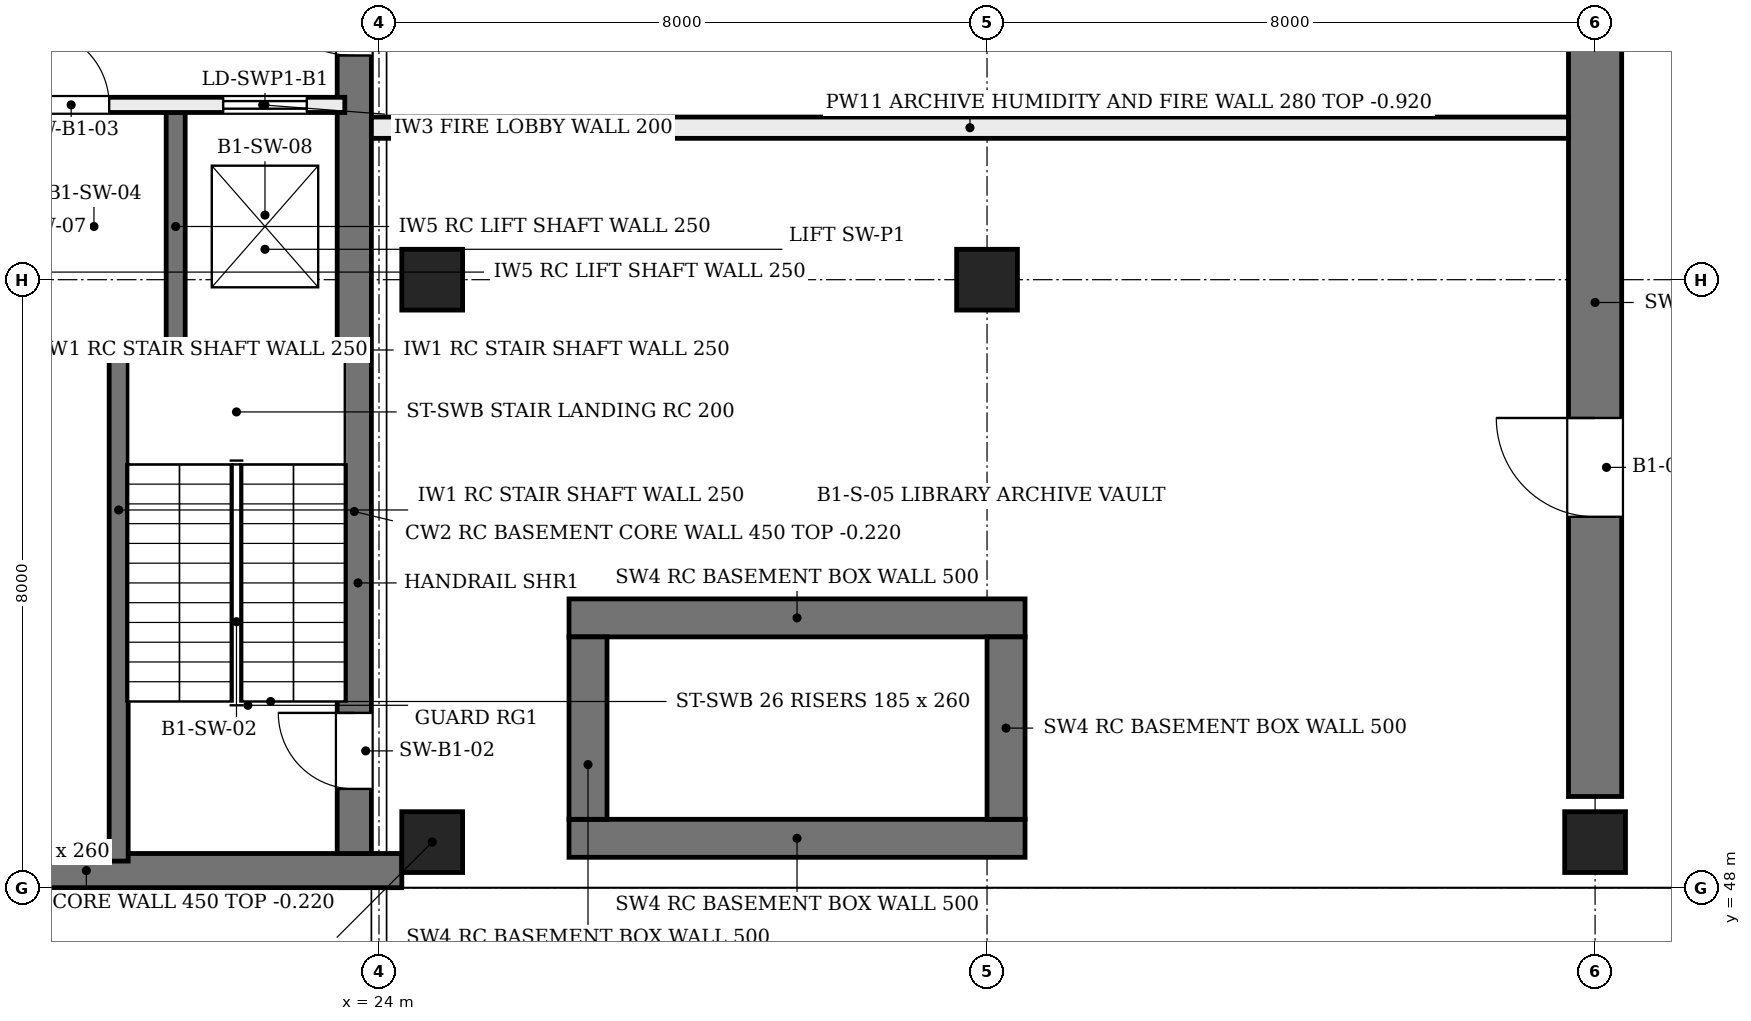
"""IFC4 building model, lengths in metres.
Left out: names, types, materials, properties, quantities, classifications, styles, units other than length and angle.
Written with IfcOpenShell. Run it as: python <this file> out.ifc"""

import sys

from ifc_helpers import new_model, si_unit, direction, frame, frame_2d, origin, origin_2d, place, context, subcontext, project, spatial, rectangle, extrude, element, fill, save


model = new_model("IFC4")
c1 = context("Model", 3, precision=1e-05, world=origin(), true_north=direction((0.0, 1.0)))
c2 = subcontext(c1, "Body", "Model", "MODEL_VIEW")
j1 = project(units=[si_unit("LENGTHUNIT", "METRE"), si_unit("PLANEANGLEUNIT", "RADIAN")], contexts=[c1])
p1 = place(None, origin())
s1 = spatial("IfcSite", under=j1, at=p1, CompositionType="ELEMENT")
p2 = place(p1, origin())
s2 = spatial("IfcBuilding", under=s1, at=p2, CompositionType="ELEMENT")
p3 = place(p2, frame((0.0, 0.0, -4.8)))
s3 = spatial("IfcBuildingStorey", under=s2, at=p3, CompositionType="ELEMENT", Elevation=-4.8)
for number, where, z_axis, x_axis in (
    (1, (26.5, 48.65, 0.0), (0.0, 0.0, 1.0), (1.0, 0.0, 0.0)),
    (2, (26.5, 51.55, 0.0), (0.0, 0.0, 1.0), (1.0, 0.0, 0.0)),
):
    element("IfcWall", number, at=place(p3, frame(where, z_axis=z_axis, x_axis=x_axis)), inside=s3, PredefinedType="SHEAR", context=c2, shape_type="SweptSolid", body=[
        extrude(rectangle(XDim=6.0, YDim=0.5, at=frame_2d((3.0, 0.0))), origin(), (0.0, 0.0, 1.0), 4.55),
    ])
for number, where, z_axis, x_axis in (
    (3, (26.75, 48.9, 0.0), (0.0, 0.0, 1.0), (0.0, 1.0, 0.0)),
    (4, (32.25, 48.9, 0.0), (0.0, 0.0, 1.0), (0.0, 1.0, 0.0)),
):
    element("IfcWall", number, at=place(p3, frame(where, z_axis=z_axis, x_axis=x_axis)), inside=s3, PredefinedType="SHEAR", context=c2, shape_type="SweptSolid", body=[
        extrude(rectangle(XDim=2.4, YDim=0.5, at=frame_2d((1.2, 0.0))), origin(), (0.0, 0.0, 1.0), 4.55),
    ])
p4 = place(p3, frame((40.0, 49.2, 0.0), z_axis=(0.0, 0.0, 1.0), x_axis=(0.0, 1.0, 0.0)))
e5 = element("IfcWall", 5, at=p4, inside=s3, PredefinedType="SHEAR", context=c2, shape_type="SweptSolid", body=[
    extrude(rectangle(XDim=13.0, YDim=0.7, at=frame_2d((6.5, 0.0))), origin(), (0.0, 0.0, 1.0), 4.55),
])
p5 = place(p4, frame((3.68, 0.0, 0.0)))
e6 = element("IfcOpeningElement", 6, at=p5, cuts=e5, PredefinedType="OPENING", context=c2, shape_type="SweptSolid", body=[
    extrude(rectangle(XDim=1.3, YDim=2.4, at=frame_2d((0.65, 1.2))), frame((0.0, 0.36, 0.0), z_axis=(0.0, -1.0, 0.0), x_axis=(1.0, 0.0, 0.0)), (0.0, 0.0, 1.0), 0.72),
])
p6 = place(p3, frame((16.0, 48.225, 0.0), z_axis=(0.0, 0.0, 1.0), x_axis=(1.0, 0.0, 0.0)))
e7 = element("IfcWall", 7, at=p6, inside=s3, PredefinedType="SHEAR", context=c2, shape_type="SweptSolid", body=[
    extrude(rectangle(XDim=8.3, YDim=0.45, at=frame_2d((4.15, 0.0))), origin(), (0.0, 0.0, 1.0), 4.58),
])
p7 = place(p3, frame((23.675, 48.45, 0.0), z_axis=(0.0, 0.0, 1.0), x_axis=(0.0, 1.0, 0.0)))
e8 = element("IfcWall", 8, at=p7, inside=s3, PredefinedType="SHEAR", context=c2, shape_type="SweptSolid", body=[
    extrude(rectangle(XDim=15.0, YDim=0.45, at=frame_2d((7.5, 0.0))), origin(), (0.0, 0.0, 1.0), 4.58),
])
p8 = place(p7, frame((0.85, 0.0, 0.0)))
e9 = element("IfcOpeningElement", 9, at=p8, cuts=e8, PredefinedType="OPENING", context=c2, shape_type="SweptSolid", body=[
    extrude(rectangle(XDim=1.0, YDim=2.1, at=frame_2d((0.5, 1.05))), frame((0.0, 0.235, 0.0), z_axis=(0.0, -1.0, 0.0), x_axis=(1.0, 0.0, 0.0)), (0.0, 0.0, 1.0), 0.47),
])
p9 = place(p7, frame((10.5, 0.0, 0.0)))
e10 = element("IfcOpeningElement", 10, at=p9, cuts=e8, PredefinedType="OPENING", context=c2, shape_type="SweptSolid", body=[
    extrude(rectangle(XDim=1.4, YDim=2.1, at=frame_2d((0.7, 1.05))), frame((0.0, 0.235, 0.0), z_axis=(0.0, -1.0, 0.0), x_axis=(1.0, 0.0, 0.0)), (0.0, 0.0, 1.0), 0.47),
])
for number, where, z_axis, x_axis in (
    (11, (24.7, 48.6, 0.0), (0.0, 0.0, 1.0), (1.0, 0.0, 0.0)),
    (12, (40.0, 48.6, 0.0), (0.0, 0.0, 1.0), (1.0, 0.0, 0.0)),
    (13, (24.7, 56.0, 0.0), (0.0, 0.0, 1.0), (1.0, 0.0, 0.0)),
    (14, (32.0, 56.0, 0.0), (0.0, 0.0, 1.0), (1.0, 0.0, 0.0)),
):
    element("IfcColumn", number, at=place(p3, frame(where, z_axis=z_axis, x_axis=x_axis)), inside=s3, PredefinedType="COLUMN", context=c2, shape_type="SweptSolid", body=[
        extrude(rectangle(XDim=0.8, YDim=0.8, at=origin_2d()), origin(), (0.0, 0.0, 1.0), 4.58),
    ])
p10 = place(p3, frame((20.575, 48.35, 0.0), z_axis=(0.0, 0.0, 1.0), x_axis=(0.0, 1.0, 0.0)))
e15 = element("IfcWall", 15, at=p10, inside=s3, PredefinedType="SOLIDWALL", context=c2, shape_type="SweptSolid", body=[
    extrude(rectangle(XDim=6.6, YDim=0.25, at=frame_2d((3.3, 0.0))), origin(), (0.0, 0.0, 1.0), 4.55),
])
p11 = place(p3, frame((20.45, 55.075, 0.0), z_axis=(0.0, 0.0, 1.0), x_axis=(1.0, 0.0, 0.0)))
e16 = element("IfcWall", 16, at=p11, inside=s3, PredefinedType="SOLIDWALL", context=c2, shape_type="SweptSolid", body=[
    extrude(rectangle(XDim=3.1, YDim=0.25, at=frame_2d((1.55, 0.0))), origin(), (0.0, 0.0, 1.0), 4.55),
])
p12 = place(p3, frame((21.325, 55.2, 0.0), z_axis=(0.0, 0.0, 1.0), x_axis=(0.0, 1.0, 0.0)))
e17 = element("IfcWall", 17, at=p12, inside=s3, PredefinedType="SOLIDWALL", context=c2, shape_type="SweptSolid", body=[
    extrude(rectangle(XDim=3.0, YDim=0.25, at=frame_2d((1.5, 0.0))), origin(), (0.0, 0.0, 1.0), 4.55),
])
p13 = place(p3, frame((16.35, 58.3, 0.0), z_axis=(0.0, 0.0, 1.0), x_axis=(1.0, 0.0, 0.0)))
e18 = element("IfcWall", 18, at=p13, inside=s3, PredefinedType="SOLIDWALL", context=c2, shape_type="SweptSolid", body=[
    extrude(rectangle(XDim=7.2, YDim=0.2, at=frame_2d((3.6, 0.0))), origin(), (0.0, 0.0, 1.0), 4.55),
])
p14 = place(p13, frame((0.5, 0.0, 0.0)))
e19 = element("IfcOpeningElement", 19, at=p14, cuts=e18, PredefinedType="OPENING", context=c2, shape_type="SweptSolid", body=[
    extrude(rectangle(XDim=1.1, YDim=2.1, at=frame_2d((0.55, 1.05))), frame((0.0, 0.11, 0.0), z_axis=(0.0, -1.0, 0.0), x_axis=(1.0, 0.0, 0.0)), (0.0, 0.0, 1.0), 0.22),
])
p15 = place(p13, frame((5.6, 0.0, 0.0)))
e20 = element("IfcOpeningElement", 20, at=p15, cuts=e18, PredefinedType="OPENING", context=c2, shape_type="SweptSolid", body=[
    extrude(rectangle(XDim=1.1, YDim=2.1, at=frame_2d((0.55, 1.05))), frame((0.0, 0.11, 0.0), z_axis=(0.0, -1.0, 0.0), x_axis=(1.0, 0.0, 0.0)), (0.0, 0.0, 1.0), 0.22),
])
p16 = place(p13, frame((3.1, 0.0, 0.0)))
e21 = element("IfcOpeningElement", 21, at=p16, cuts=e18, PredefinedType="OPENING", context=c2, shape_type="SweptSolid", body=[
    extrude(rectangle(XDim=1.0, YDim=2.1, at=frame_2d((0.5, 1.05))), frame((0.0, 0.11, 0.0), z_axis=(0.0, -1.0, 0.0), x_axis=(1.0, 0.0, 0.0)), (0.0, 0.0, 1.0), 0.22),
])
p17 = place(p3, frame((23.9, 58.0, 0.0), z_axis=(0.0, 0.0, 1.0), x_axis=(1.0, 0.0, 0.0)))
e22 = element("IfcWall", 22, at=p17, inside=s3, PredefinedType="PARTITIONING", context=c2, shape_type="SweptSolid", body=[
    extrude(rectangle(XDim=15.75, YDim=0.28, at=frame_2d((7.875, 0.0))), origin(), (0.0, 0.0, 1.0), 3.88),
])
p18 = place(p8, frame((1.0, 0.0, 0.0), z_axis=(0.0, 0.0, 1.0), x_axis=(-1.0, 0.0, 0.0)))
e23 = element("IfcDoor", 23, at=p18, inside=s3, OperationType="SINGLE_SWING_RIGHT", PredefinedType="DOOR", context=c2, shape_type="SweptSolid", body=[
    extrude(rectangle(XDim=1.0, YDim=2.1, at=frame_2d((0.5, 1.05))), frame((0.0, 0.025, 0.0), z_axis=(0.0, -1.0, 0.0), x_axis=(1.0, 0.0, 0.0)), (0.0, 0.0, 1.0), 0.05),
])
fill(e9, e23)
p19 = place(p15, origin())
e24 = element("IfcDoor", 24, at=p19, inside=s3, OperationType="DOUBLE_DOOR_SLIDING", PredefinedType="DOOR", context=c2, shape_type="SweptSolid", body=[
    extrude(rectangle(XDim=1.1, YDim=2.1, at=frame_2d((0.55, 1.05))), frame((0.0, 0.025, 0.0), z_axis=(0.0, -1.0, 0.0), x_axis=(1.0, 0.0, 0.0)), (0.0, 0.0, 1.0), 0.05),
])
fill(e20, e24)
p20 = place(p16, origin())
e25 = element("IfcDoor", 25, at=p20, inside=s3, OperationType="SINGLE_SWING_LEFT", PredefinedType="DOOR", context=c2, shape_type="SweptSolid", body=[
    extrude(rectangle(XDim=1.0, YDim=2.1, at=frame_2d((0.5, 1.05))), frame((0.0, 0.025, 0.0), z_axis=(0.0, -1.0, 0.0), x_axis=(1.0, 0.0, 0.0)), (0.0, 0.0, 1.0), 0.05),
])
fill(e21, e25)
p21 = place(p9, frame((1.4, 0.0, 0.0), z_axis=(0.0, 0.0, 1.0), x_axis=(-1.0, 0.0, 0.0)))
e26 = element("IfcDoor", 26, at=p21, inside=s3, OperationType="SINGLE_SWING_RIGHT", PredefinedType="DOOR", context=c2, shape_type="SweptSolid", body=[
    extrude(rectangle(XDim=1.4, YDim=2.1, at=frame_2d((0.7, 1.05))), frame((0.0, 0.025, 0.0), z_axis=(0.0, -1.0, 0.0), x_axis=(1.0, 0.0, 0.0)), (0.0, 0.0, 1.0), 0.05),
])
fill(e10, e26)
p22 = place(p5, frame((1.3, 0.0, 0.0), z_axis=(0.0, 0.0, 1.0), x_axis=(-1.0, 0.0, 0.0)))
e27 = element("IfcDoor", 27, at=p22, inside=s3, OperationType="SINGLE_SWING_RIGHT", PredefinedType="DOOR", context=c2, shape_type="SweptSolid", body=[
    extrude(rectangle(XDim=1.3, YDim=2.4, at=frame_2d((0.65, 1.2))), frame((0.0, 0.025, 0.0), z_axis=(0.0, -1.0, 0.0), x_axis=(1.0, 0.0, 0.0)), (0.0, 0.0, 1.0), 0.05),
])
fill(e6, e27)
save(model, sys.argv[1])
